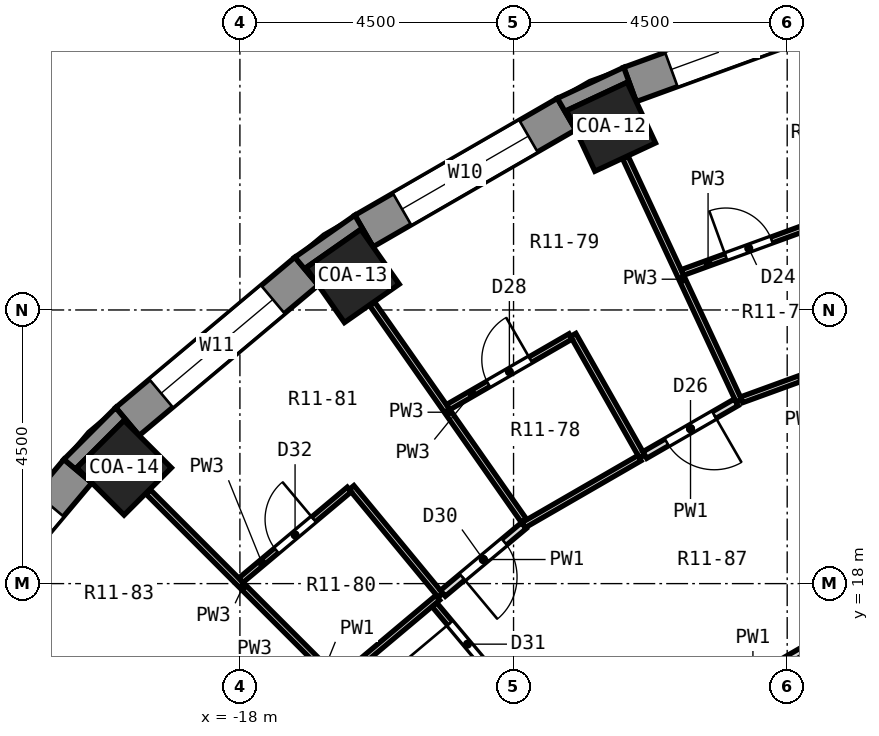
"""IFC4 building model, lengths in metres.
Left out: names, types, materials, properties, quantities, classifications, styles, units other than length and angle.
Written with IfcOpenShell. Run it as: python <this file> out.ifc"""

import sys

from ifc_helpers import new_model, si_unit, direction, frame, frame_2d, origin, origin_2d, place, context, subcontext, project, spatial, polyline, rectangle, outline, extrude, element, fill, save


model = new_model("IFC4")
c1 = context("Model", 3, precision=1e-05, world=origin(), true_north=direction((0.0, 1.0)))
c2 = subcontext(c1, "Body", "Model", "MODEL_VIEW")
j1 = project(units=[si_unit("LENGTHUNIT", "METRE"), si_unit("PLANEANGLEUNIT", "RADIAN")], contexts=[c1])
p1 = place(None, origin())
s1 = spatial("IfcSite", under=j1, at=p1, CompositionType="ELEMENT")
p2 = place(p1, origin())
s2 = spatial("IfcBuilding", under=s1, at=p2, CompositionType="ELEMENT")
p3 = place(p2, frame((0.0, 0.0, 46.1)))
s3 = spatial("IfcBuildingStorey", under=s2, at=p3, CompositionType="ELEMENT", Elevation=46.1)
for number, where, z_axis, x_axis in (
    (1, (-11.897, 25.512, 0.0), (0.0, 0.0, 1.0), (-0.423, 0.906, 0.0)),
    (2, (-16.146, 23.059, 0.0), (0.0, 0.0, 1.0), (-0.574, 0.819, 0.0)),
    (3, (-19.905, 19.905, 0.0), (0.0, 0.0, 1.0), (-0.707, 0.707, 0.0)),
):
    element("IfcColumn", number, at=place(p3, frame(where, z_axis=z_axis, x_axis=x_axis)), inside=s3, PredefinedType="COLUMN", context=c2, shape_type="SweptSolid", body=[
        extrude(rectangle(XDim=1.1, YDim=1.1, at=origin_2d()), origin(), (0.0, 0.0, 1.0), 3.3),
    ])
p4 = place(p3, frame((-7.971, 27.523, 0.0), z_axis=(0.0, 0.0, 1.0), x_axis=(-0.939689588564, -0.342028474173, 0.0)))
e4 = element("IfcWall", 4, at=p4, inside=s3, PredefinedType="SOLIDWALL", context=c2, shape_type="SweptSolid", body=[
    extrude(rectangle(XDim=3.846, YDim=0.6, at=frame_2d((1.923, 0.0))), origin(), (0.0, 0.0, 1.0), 2.75),
])
p5 = place(p4, frame((0.723, 0.0, 0.9)))
e5 = element("IfcOpeningElement", 5, at=p5, cuts=e4, PredefinedType="OPENING", context=c2, shape_type="SweptSolid", body=[
    extrude(rectangle(XDim=2.4, YDim=1.8, at=frame_2d((1.2, 0.9))), frame((0.0, 0.312, 0.0), z_axis=(0.0, -1.0, 0.0), x_axis=(1.0, 0.0, 0.0)), (0.0, 0.0, 1.0), 0.624),
])
p6 = place(p3, frame((-12.63, 25.721, 0.0), z_axis=(0.0, 0.0, 1.0), x_axis=(-0.86603124159, -0.499989888488, 0.0)))
e6 = element("IfcWall", 6, at=p6, inside=s3, PredefinedType="SOLIDWALL", context=c2, shape_type="SweptSolid", body=[
    extrude(rectangle(XDim=3.846, YDim=0.6, at=frame_2d((1.923, 0.0))), origin(), (0.0, 0.0, 1.0), 2.75),
])
p7 = place(p6, frame((0.723, 0.0, 0.9)))
e7 = element("IfcOpeningElement", 7, at=p7, cuts=e6, PredefinedType="OPENING", context=c2, shape_type="SweptSolid", body=[
    extrude(rectangle(XDim=2.4, YDim=1.8, at=frame_2d((1.2, 0.9))), frame((0.0, 0.312, 0.0), z_axis=(0.0, -1.0, 0.0), x_axis=(1.0, 0.0, 0.0)), (0.0, 0.0, 1.0), 0.624),
])
p8 = place(p3, frame((-16.904, 23.137, 0.0), z_axis=(0.0, 0.0, 1.0), x_axis=(-0.766026164483, -0.642809392687, 0.0)))
e8 = element("IfcWall", 8, at=p8, inside=s3, PredefinedType="SOLIDWALL", context=c2, shape_type="SweptSolid", body=[
    extrude(rectangle(XDim=3.846, YDim=0.6, at=frame_2d((1.923, 0.0))), origin(), (0.0, 0.0, 1.0), 2.75),
])
p9 = place(p8, frame((0.723, 0.0, 0.9)))
e9 = element("IfcOpeningElement", 9, at=p9, cuts=e8, PredefinedType="OPENING", context=c2, shape_type="SweptSolid", body=[
    extrude(rectangle(XDim=2.4, YDim=1.8, at=frame_2d((1.2, 0.9))), frame((0.0, 0.312, 0.0), z_axis=(0.0, -1.0, 0.0), x_axis=(1.0, 0.0, 0.0)), (0.0, 0.0, 1.0), 0.624),
])
p10 = place(p3, frame((-20.665, 19.85, 0.0), z_axis=(0.0, 0.0, 1.0), x_axis=(-0.642809392687, -0.766026164483, 0.0)))
e10 = element("IfcWall", 10, at=p10, inside=s3, PredefinedType="SOLIDWALL", context=c2, shape_type="SweptSolid", body=[
    extrude(rectangle(XDim=3.846, YDim=0.6, at=frame_2d((1.923, 0.0))), origin(), (0.0, 0.0, 1.0), 2.75),
])
p11 = place(p10, frame((0.723, 0.0, 0.9)))
e11 = element("IfcOpeningElement", 11, at=p11, cuts=e10, PredefinedType="OPENING", context=c2, shape_type="SweptSolid", body=[
    extrude(rectangle(XDim=2.4, YDim=1.8, at=frame_2d((1.2, 0.9))), frame((0.0, 0.312, 0.0), z_axis=(0.0, -1.0, 0.0), x_axis=(1.0, 0.0, 0.0)), (0.0, 0.0, 1.0), 0.624),
])
p12 = place(p3, origin())
e12 = element("IfcWall", 12, at=p12, inside=s3, PredefinedType="SOLIDWALL", context=c2, shape_type="SweptSolid", body=[
    extrude(outline(polyline([(-12.78, 25.981), (-12.479, 25.461), (-12.628, 25.779), (-11.631, 26.243), (-11.483, 25.926), (-11.688, 26.49), (-12.78, 25.981)])), origin(), (0.0, 0.0, 1.0), 2.75),
])
p13 = place(p3, origin())
e13 = element("IfcWall", 13, at=p13, inside=s3, PredefinedType="SOLIDWALL", context=c2, shape_type="SweptSolid", body=[
    extrude(outline(polyline([(-16.11, 24.058), (-17.097, 23.367), (-16.711, 22.907), (-16.912, 23.194), (-16.011, 23.825), (-15.81, 23.538), (-16.11, 24.058)])), origin(), (0.0, 0.0, 1.0), 2.75),
])
p14 = place(p3, origin())
e14 = element("IfcWall", 14, at=p14, inside=s3, PredefinedType="SOLIDWALL", context=c2, shape_type="SweptSolid", body=[
    extrude(outline(polyline([(-20.895, 20.043), (-20.435, 19.657), (-20.683, 19.905), (-19.905, 20.683), (-19.657, 20.435), (-20.043, 20.895), (-20.895, 20.043)])), origin(), (0.0, 0.0, 1.0), 2.75),
])
p15 = place(p3, frame((-11.66, 25.005, 0.0), z_axis=(0.0, 0.0, 1.0), x_axis=(0.422658280027, -0.906289125127, 0.0)))
e15 = element("IfcWall", 15, at=p15, inside=s3, PredefinedType="PARTITIONING", context=c2, shape_type="SweptSolid", body=[
    extrude(rectangle(XDim=4.413, YDim=0.1, at=frame_2d((2.206, 0.0))), origin(), (0.0, 0.0, 1.0), 2.75),
])
p16 = place(p3, frame((-12.519, 22.09, 0.0), z_axis=(0.0, 0.0, 1.0), x_axis=(0.49306078006, -0.869994866173, 0.0)))
e16 = element("IfcWall", 16, at=p16, inside=s3, PredefinedType="PARTITIONING", context=c2, shape_type="SweptSolid", body=[
    extrude(rectangle(XDim=2.3, YDim=0.1, at=frame_2d((1.15, 0.0))), origin(), (0.0, 0.0, 1.0), 2.75),
])
p17 = place(p3, frame((-15.825, 22.6, 0.0), z_axis=(0.0, 0.0, 1.0), x_axis=(0.573326730149, -0.819326833746, 0.0)))
e17 = element("IfcWall", 17, at=p17, inside=s3, PredefinedType="PARTITIONING", context=c2, shape_type="SweptSolid", body=[
    extrude(rectangle(XDim=4.35, YDim=0.1, at=frame_2d((2.175, 0.0))), origin(), (0.0, 0.0, 1.0), 2.75),
])
p18 = place(p3, frame((-16.164, 19.58, 0.0), z_axis=(0.0, 0.0, 1.0), x_axis=(0.636700344293, -0.771111322428, 0.0)))
e18 = element("IfcWall", 18, at=p18, inside=s3, PredefinedType="PARTITIONING", context=c2, shape_type="SweptSolid", body=[
    extrude(rectangle(XDim=2.3, YDim=0.1, at=frame_2d((1.15, 0.0))), origin(), (0.0, 0.0, 1.0), 2.75),
])
p19 = place(p3, frame((-14.803, 17.655, 0.0), z_axis=(0.0, 0.0, 1.0), x_axis=(0.642514396039, -0.766273613589, 0.0)))
e19 = element("IfcWall", 19, at=p19, inside=s3, PredefinedType="PARTITIONING", context=c2, shape_type="SweptSolid", body=[
    extrude(rectangle(XDim=3.685, YDim=0.1, at=frame_2d((1.843, 0.0))), origin(), (0.0, 0.0, 1.0), 2.75),
])
p20 = place(p19, frame((0.399, 0.0, 0.0)))
e20 = element("IfcOpeningElement", 20, at=p20, cuts=e19, PredefinedType="OPENING", context=c2, shape_type="SweptSolid", body=[
    extrude(rectangle(XDim=0.9, YDim=2.1, at=frame_2d((0.45, 1.05))), frame((0.0, 0.062, 0.0), z_axis=(0.0, -1.0, 0.0), x_axis=(1.0, 0.0, 0.0)), (0.0, 0.0, 1.0), 0.124),
])
p21 = place(p3, frame((-19.509, 19.509, 0.0), z_axis=(0.0, 0.0, 1.0), x_axis=(0.707106781187, -0.707106781187, 0.0)))
e21 = element("IfcWall", 21, at=p21, inside=s3, PredefinedType="PARTITIONING", context=c2, shape_type="SweptSolid", body=[
    extrude(rectangle(XDim=4.413, YDim=0.1, at=frame_2d((2.206, 0.0))), origin(), (0.0, 0.0, 1.0), 2.75),
])
p22 = place(p3, frame((-9.748, 21.023, 0.0), z_axis=(0.0, 0.0, 1.0), x_axis=(0.939725675468, 0.341929312674, 0.0)))
e22 = element("IfcWall", 22, at=p22, inside=s3, PredefinedType="PARTITIONING", context=c2, shape_type="SweptSolid", body=[
    extrude(rectangle(XDim=2.105, YDim=0.1, at=frame_2d((1.052, 0.0))), origin(), (0.0, 0.0, 1.0), 2.75),
])
p23 = place(p3, frame((-10.724, 23.116, 0.0), z_axis=(0.0, 0.0, 1.0), x_axis=(0.939716717369, 0.34195393125, 0.0)))
e23 = element("IfcWall", 23, at=p23, inside=s3, PredefinedType="PARTITIONING", context=c2, shape_type="SweptSolid", body=[
    extrude(rectangle(XDim=2.324, YDim=0.1, at=frame_2d((1.162, 0.0))), origin(), (0.0, 0.0, 1.0), 2.75),
])
p24 = place(p23, frame((0.762, 0.0, 0.0)))
e24 = element("IfcOpeningElement", 24, at=p24, cuts=e23, PredefinedType="OPENING", context=c2, shape_type="SweptSolid", body=[
    extrude(rectangle(XDim=0.8, YDim=2.1, at=frame_2d((0.4, 1.05))), frame((0.0, 0.062, 0.0), z_axis=(0.0, -1.0, 0.0), x_axis=(1.0, 0.0, 0.0)), (0.0, 0.0, 1.0), 0.124),
])
p25 = place(p3, frame((-12.244, 12.329, 0.0), z_axis=(0.0, 0.0, 1.0), x_axis=(0.865979941794, 0.500078734211, 0.0)))
e25 = element("IfcWall", 25, at=p25, inside=s3, PredefinedType="PARTITIONING", context=c2, shape_type="SweptSolid", body=[
    extrude(rectangle(XDim=8.877, YDim=0.125, at=frame_2d((4.439, 0.0))), origin(), (0.0, 0.0, 1.0), 2.75),
])
p26 = place(p25, frame((3.501, 0.0, 0.0)))
e26 = element("IfcOpeningElement", 26, at=p26, cuts=e25, PredefinedType="OPENING", context=c2, shape_type="SweptSolid", body=[
    extrude(rectangle(XDim=1.0, YDim=2.1, at=frame_2d((0.5, 1.05))), frame((0.0, 0.074, 0.0), z_axis=(0.0, -1.0, 0.0), x_axis=(1.0, 0.0, 0.0)), (0.0, 0.0, 1.0), 0.149),
])
p27 = place(p3, frame((-13.971, 13.873, 0.0), z_axis=(0.0, 0.0, 1.0), x_axis=(0.86602502492, 0.500000656212, 0.0)))
e27 = element("IfcWall", 27, at=p27, inside=s3, PredefinedType="PARTITIONING", context=c2, shape_type="SweptSolid", body=[
    extrude(rectangle(XDim=10.179, YDim=0.125, at=frame_2d((5.09, 0.0))), origin(), (0.0, 0.0, 1.0), 2.75),
])
p28 = place(p3, frame((-13.338, 18.961, 0.0), z_axis=(0.0, 0.0, 1.0), x_axis=(0.865883187712, 0.500246244601, 0.0)))
e28 = element("IfcWall", 28, at=p28, inside=s3, PredefinedType="PARTITIONING", context=c2, shape_type="SweptSolid", body=[
    extrude(rectangle(XDim=2.206, YDim=0.1, at=frame_2d((1.103, 0.0))), origin(), (0.0, 0.0, 1.0), 2.75),
])
p29 = place(p3, frame((-11.342, 20.114, 0.0), z_axis=(0.0, 0.0, 1.0), x_axis=(0.866288616225, 0.499543825303, 0.0)))
e29 = element("IfcWall", 29, at=p29, inside=s3, PredefinedType="PARTITIONING", context=c2, shape_type="SweptSolid", body=[
    extrude(rectangle(XDim=1.735, YDim=0.125, at=frame_2d((0.868, 0.0))), origin(), (0.0, 0.0, 1.0), 2.75),
])
p30 = place(p29, frame((0.418, 0.0, 0.0)))
e30 = element("IfcOpeningElement", 30, at=p30, cuts=e29, PredefinedType="OPENING", context=c2, shape_type="SweptSolid", body=[
    extrude(rectangle(XDim=0.9, YDim=2.1, at=frame_2d((0.45, 1.05))), frame((0.0, 0.074, 0.0), z_axis=(0.0, -1.0, 0.0), x_axis=(1.0, 0.0, 0.0)), (0.0, 0.0, 1.0), 0.149),
])
p31 = place(p3, frame((-14.575, 20.902, 0.0), z_axis=(0.0, 0.0, 1.0), x_axis=(0.865919666768, 0.50018309718, 0.0)))
e31 = element("IfcWall", 31, at=p31, inside=s3, PredefinedType="PARTITIONING", context=c2, shape_type="SweptSolid", body=[
    extrude(rectangle(XDim=2.324, YDim=0.1, at=frame_2d((1.162, 0.0))), origin(), (0.0, 0.0, 1.0), 2.75),
])
p32 = place(p31, frame((0.762, 0.0, 0.0)))
e32 = element("IfcOpeningElement", 32, at=p32, cuts=e31, PredefinedType="OPENING", context=c2, shape_type="SweptSolid", body=[
    extrude(rectangle(XDim=0.8, YDim=2.1, at=frame_2d((0.4, 1.05))), frame((0.0, 0.062, 0.0), z_axis=(0.0, -1.0, 0.0), x_axis=(1.0, 0.0, 0.0)), (0.0, 0.0, 1.0), 0.124),
])
p33 = place(p3, frame((-14.663, 17.84, 0.0), z_axis=(0.0, 0.0, 1.0), x_axis=(0.767205284681, 0.641401630149, 0.0)))
e33 = element("IfcWall", 33, at=p33, inside=s3, PredefinedType="PARTITIONING", context=c2, shape_type="SweptSolid", body=[
    extrude(rectangle(XDim=1.735, YDim=0.125, at=frame_2d((0.867, 0.0))), origin(), (0.0, 0.0, 1.0), 2.75),
])
p34 = place(p33, frame((0.417, 0.0, 0.0)))
e34 = element("IfcOpeningElement", 34, at=p34, cuts=e33, PredefinedType="OPENING", context=c2, shape_type="SweptSolid", body=[
    extrude(rectangle(XDim=0.9, YDim=2.1, at=frame_2d((0.45, 1.05))), frame((0.0, 0.074, 0.0), z_axis=(0.0, -1.0, 0.0), x_axis=(1.0, 0.0, 0.0)), (0.0, 0.0, 1.0), 0.149),
])
p35 = place(p3, frame((-16.351, 16.421, 0.0), z_axis=(0.0, 0.0, 1.0), x_axis=(0.765854222204, 0.643014238048, 0.0)))
e35 = element("IfcWall", 35, at=p35, inside=s3, PredefinedType="PARTITIONING", context=c2, shape_type="SweptSolid", body=[
    extrude(rectangle(XDim=2.093, YDim=0.1, at=frame_2d((1.046, 0.0))), origin(), (0.0, 0.0, 1.0), 2.75),
])
p36 = place(p3, frame((-17.984, 18.054, 0.0), z_axis=(0.0, 0.0, 1.0), x_axis=(0.766254925891, 0.642536682648, 0.0)))
e36 = element("IfcWall", 36, at=p36, inside=s3, PredefinedType="PARTITIONING", context=c2, shape_type="SweptSolid", body=[
    extrude(rectangle(XDim=2.325, YDim=0.1, at=frame_2d((1.162, 0.0))), origin(), (0.0, 0.0, 1.0), 2.75),
])
p37 = place(p36, frame((0.762, 0.0, 0.0)))
e37 = element("IfcOpeningElement", 37, at=p37, cuts=e36, PredefinedType="OPENING", context=c2, shape_type="SweptSolid", body=[
    extrude(rectangle(XDim=0.8, YDim=2.1, at=frame_2d((0.4, 1.05))), frame((0.0, 0.062, 0.0), z_axis=(0.0, -1.0, 0.0), x_axis=(1.0, 0.0, 0.0)), (0.0, 0.0, 1.0), 0.124),
])
p38 = place(p5, origin())
e38 = element("IfcWindow", 38, at=p38, inside=s3, PartitioningType="SINGLE_PANEL", PredefinedType="WINDOW", context=c2, shape_type="SweptSolid", body=[
    extrude(rectangle(XDim=2.4, YDim=1.8, at=frame_2d((1.2, 0.9))), frame((0.0, 0.18, 0.0), z_axis=(0.0, -1.0, 0.0), x_axis=(1.0, 0.0, 0.0)), (0.0, 0.0, 1.0), 0.06),
])
fill(e5, e38)
p39 = place(p7, origin())
e39 = element("IfcWindow", 39, at=p39, inside=s3, PartitioningType="SINGLE_PANEL", PredefinedType="WINDOW", context=c2, shape_type="SweptSolid", body=[
    extrude(rectangle(XDim=2.4, YDim=1.8, at=frame_2d((1.2, 0.9))), frame((0.0, 0.18, 0.0), z_axis=(0.0, -1.0, 0.0), x_axis=(1.0, 0.0, 0.0)), (0.0, 0.0, 1.0), 0.06),
])
fill(e7, e39)
p40 = place(p9, origin())
e40 = element("IfcWindow", 40, at=p40, inside=s3, PartitioningType="SINGLE_PANEL", PredefinedType="WINDOW", context=c2, shape_type="SweptSolid", body=[
    extrude(rectangle(XDim=2.4, YDim=1.8, at=frame_2d((1.2, 0.9))), frame((0.0, 0.18, 0.0), z_axis=(0.0, -1.0, 0.0), x_axis=(1.0, 0.0, 0.0)), (0.0, 0.0, 1.0), 0.06),
])
fill(e9, e40)
p41 = place(p11, origin())
e41 = element("IfcWindow", 41, at=p41, inside=s3, PartitioningType="SINGLE_PANEL", PredefinedType="WINDOW", context=c2, shape_type="SweptSolid", body=[
    extrude(rectangle(XDim=2.4, YDim=1.8, at=frame_2d((1.2, 0.9))), frame((0.0, 0.18, 0.0), z_axis=(0.0, -1.0, 0.0), x_axis=(1.0, 0.0, 0.0)), (0.0, 0.0, 1.0), 0.06),
])
fill(e11, e41)
p42 = place(p24, origin())
e42 = element("IfcDoor", 42, at=p42, inside=s3, OperationType="SINGLE_SWING_LEFT", PredefinedType="DOOR", context=c2, shape_type="SweptSolid", body=[
    extrude(rectangle(XDim=0.8, YDim=2.1, at=frame_2d((0.4, 1.05))), frame((0.0, 0.025, 0.0), z_axis=(0.0, -1.0, 0.0), x_axis=(1.0, 0.0, 0.0)), (0.0, 0.0, 1.0), 0.05),
])
fill(e24, e42)
p43 = place(p30, frame((0.9, 0.0, 0.0), z_axis=(0.0, 0.0, 1.0), x_axis=(-1.0, 0.0, 0.0)))
e43 = element("IfcDoor", 43, at=p43, inside=s3, OperationType="SINGLE_SWING_LEFT", PredefinedType="DOOR", context=c2, shape_type="SweptSolid", body=[
    extrude(rectangle(XDim=0.9, YDim=2.1, at=frame_2d((0.45, 1.05))), frame((0.0, 0.025, 0.0), z_axis=(0.0, -1.0, 0.0), x_axis=(1.0, 0.0, 0.0)), (0.0, 0.0, 1.0), 0.05),
])
fill(e30, e43)
p44 = place(p32, origin())
e44 = element("IfcDoor", 44, at=p44, inside=s3, OperationType="SINGLE_SWING_RIGHT", PredefinedType="DOOR", context=c2, shape_type="SweptSolid", body=[
    extrude(rectangle(XDim=0.8, YDim=2.1, at=frame_2d((0.4, 1.05))), frame((0.0, 0.025, 0.0), z_axis=(0.0, -1.0, 0.0), x_axis=(1.0, 0.0, 0.0)), (0.0, 0.0, 1.0), 0.05),
])
fill(e32, e44)
p45 = place(p34, frame((0.9, 0.0, 0.0), z_axis=(0.0, 0.0, 1.0), x_axis=(-1.0, 0.0, 0.0)))
e45 = element("IfcDoor", 45, at=p45, inside=s3, OperationType="SINGLE_SWING_RIGHT", PredefinedType="DOOR", context=c2, shape_type="SweptSolid", body=[
    extrude(rectangle(XDim=0.9, YDim=2.1, at=frame_2d((0.45, 1.05))), frame((0.0, 0.025, 0.0), z_axis=(0.0, -1.0, 0.0), x_axis=(1.0, 0.0, 0.0)), (0.0, 0.0, 1.0), 0.05),
])
fill(e34, e45)
p46 = place(p20, frame((0.9, 0.0, 0.0), z_axis=(0.0, 0.0, 1.0), x_axis=(-1.0, 0.0, 0.0)))
e46 = element("IfcDoor", 46, at=p46, inside=s3, OperationType="SINGLE_SWING_RIGHT", PredefinedType="DOOR", context=c2, shape_type="SweptSolid", body=[
    extrude(rectangle(XDim=0.9, YDim=2.1, at=frame_2d((0.45, 1.05))), frame((0.0, 0.025, 0.0), z_axis=(0.0, -1.0, 0.0), x_axis=(1.0, 0.0, 0.0)), (0.0, 0.0, 1.0), 0.05),
])
fill(e20, e46)
p47 = place(p37, origin())
e47 = element("IfcDoor", 47, at=p47, inside=s3, OperationType="SINGLE_SWING_RIGHT", PredefinedType="DOOR", context=c2, shape_type="SweptSolid", body=[
    extrude(rectangle(XDim=0.8, YDim=2.1, at=frame_2d((0.4, 1.05))), frame((0.0, 0.025, 0.0), z_axis=(0.0, -1.0, 0.0), x_axis=(1.0, 0.0, 0.0)), (0.0, 0.0, 1.0), 0.05),
])
fill(e37, e47)
save(model, sys.argv[1])
